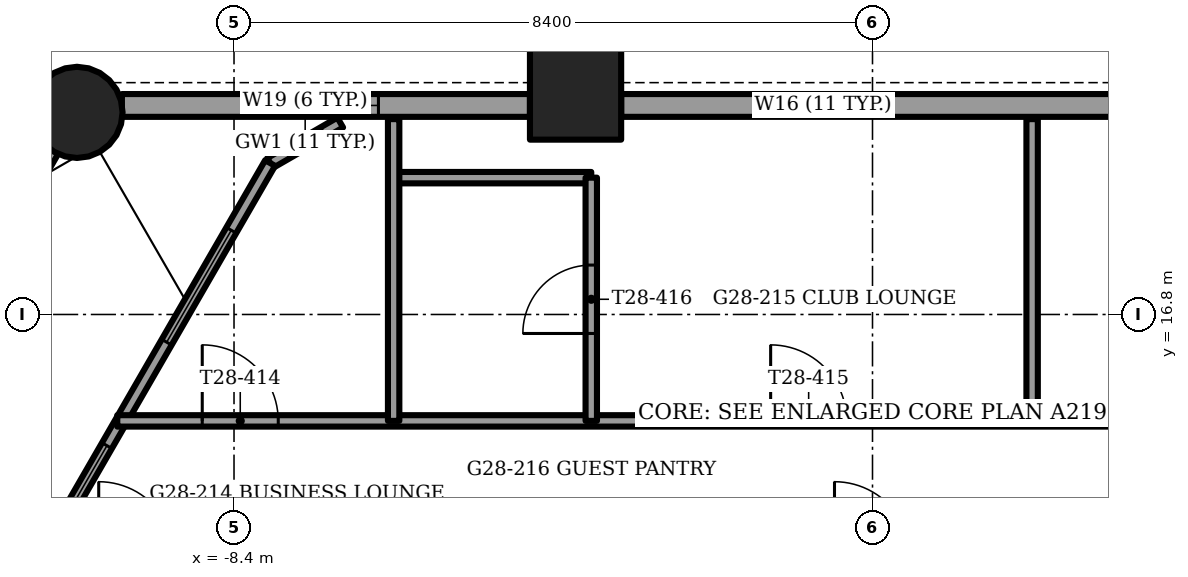
"""IFC4 building model, lengths in metres.
Left out: names, types, materials, properties, quantities, classifications, styles, units other than length and angle.
Written with IfcOpenShell. Run it as: python <this file> out.ifc"""

import sys

from ifc_helpers import new_model, si_unit, direction, frame, frame_2d, origin, origin_2d, place, context, subcontext, project, spatial, rectangle, circle, extrude, element, fill, save


model = new_model("IFC4")
c1 = context("Model", 3, precision=1e-05, world=origin(), true_north=direction((0.0, 1.0)))
c2 = subcontext(c1, "Body", "Model", "MODEL_VIEW")
j1 = project(units=[si_unit("LENGTHUNIT", "METRE"), si_unit("PLANEANGLEUNIT", "RADIAN")], contexts=[c1])
p1 = place(None, origin())
s1 = spatial("IfcSite", under=j1, at=p1, CompositionType="ELEMENT")
p2 = place(p1, origin())
s2 = spatial("IfcBuilding", under=s1, at=p2, CompositionType="ELEMENT")
p3 = place(p2, frame((0.0, 0.0, 116.0)))
s3 = spatial("IfcBuildingStorey", under=s2, at=p3, CompositionType="ELEMENT", Elevation=116.0)
p4 = place(p3, frame((-10.466, 19.459, -1.2), z_axis=(0.0, 0.0, 1.0), x_axis=(1.0, 0.0, 0.0)))
e1 = element("IfcColumn", 1, at=p4, inside=s3, PredefinedType="COLUMN", context=c2, shape_type="SweptSolid", body=[
    extrude(circle(Radius=0.6, at=origin_2d()), origin(), (0.0, 0.0, 1.0), 3.75),
])
p5 = place(p3, frame((-3.907, 19.7, -1.2), z_axis=(0.0, 0.0, 1.0), x_axis=(1.0, 0.0, 0.0)))
e2 = element("IfcColumn", 2, at=p5, inside=s3, PredefinedType="COLUMN", context=c2, shape_type="SweptSolid", body=[
    extrude(rectangle(XDim=1.2, YDim=1.2, at=origin_2d()), origin(), (0.0, 0.0, 1.0), 3.75),
])
p6 = place(p3, frame((-11.017, 19.286, 0.0), z_axis=(0.0, 0.0, 1.0), x_axis=(-0.500012951941, -0.866017925849, 0.0)))
e3 = element("IfcWall", 3, at=p6, inside=s3, PredefinedType="PARAPET", context=c2, shape_type="SweptSolid", body=[
    extrude(rectangle(XDim=6.717, YDim=0.9, at=frame_2d((3.358, 0.0))), origin(), (0.0, 0.0, 1.0), 1.1),
])
p7 = place(p3, frame((3.307, 19.55, 0.0), z_axis=(0.0, 0.0, 1.0), x_axis=(-1.0, 0.0, 0.0)))
e4 = element("IfcWall", 4, at=p7, inside=s3, PredefinedType="SOLIDWALL", context=c2, shape_type="SweptSolid", body=[
    extrude(rectangle(XDim=6.613, YDim=0.3, at=frame_2d((3.307, 0.0))), origin(), (0.0, 0.0, 1.0), 2.55),
])
p8 = place(p7, frame((3.507, 0.0, 0.15)))
e5 = element("IfcOpeningElement", 5, at=p8, cuts=e4, PredefinedType="OPENING", context=c2, shape_type="SweptSolid", body=[
    extrude(rectangle(XDim=0.9, YDim=2.15, at=frame_2d((0.45, 1.075))), frame((0.0, 0.15, 0.0), z_axis=(0.0, -1.0, 0.0), x_axis=(1.0, 0.0, 0.0)), (0.0, 0.0, 1.0), 0.3),
])
p9 = place(p3, frame((-4.507, 19.55, 0.0), z_axis=(0.0, 0.0, 1.0), x_axis=(-1.0, 0.0, 0.0)))
e6 = element("IfcWall", 6, at=p9, inside=s3, PredefinedType="SOLIDWALL", context=c2, shape_type="SweptSolid", body=[
    extrude(rectangle(XDim=5.368, YDim=0.3, at=frame_2d((2.684, 0.0))), origin(), (0.0, 0.0, 1.0), 2.55),
])
p10 = place(p9, frame((1.993, 0.0, 0.15)))
e7 = element("IfcOpeningElement", 7, at=p10, cuts=e6, PredefinedType="OPENING", context=c2, shape_type="SweptSolid", body=[
    extrude(rectangle(XDim=0.9, YDim=2.15, at=frame_2d((0.45, 1.075))), frame((0.0, 0.15, 0.0), z_axis=(0.0, -1.0, 0.0), x_axis=(1.0, 0.0, 0.0)), (0.0, 0.0, 1.0), 0.3),
])
p11 = place(p3, frame((-7.925, 18.792, 0.0), z_axis=(0.0, 0.0, 1.0), x_axis=(-0.499994842654, -0.866028381359, 0.0)))
e8 = element("IfcWall", 8, at=p11, inside=s3, PredefinedType="SOLIDWALL", context=c2, shape_type="SweptSolid", body=[
    extrude(rectangle(XDim=21.853, YDim=0.15, at=frame_2d((10.927, 0.0))), origin(), (0.0, 0.0, 1.0), 3.45),
])
p12 = place(p11, frame((4.293, 0.0, 0.15)))
e9 = element("IfcOpeningElement", 9, at=p12, cuts=e8, PredefinedType="OPENING", context=c2, shape_type="SweptSolid", body=[
    extrude(rectangle(XDim=0.9, YDim=2.85, at=frame_2d((0.45, 1.425))), frame((0.0, 0.075, 0.0), z_axis=(0.0, -1.0, 0.0), x_axis=(1.0, 0.0, 0.0)), (0.0, 0.0, 1.0), 0.15),
])
p13 = place(p11, frame((8.412, 0.0, 0.15)))
e10 = element("IfcOpeningElement", 10, at=p13, cuts=e8, PredefinedType="OPENING", context=c2, shape_type="SweptSolid", body=[
    extrude(rectangle(XDim=0.9, YDim=2.85, at=frame_2d((0.45, 1.425))), frame((0.0, 0.075, 0.0), z_axis=(0.0, -1.0, 0.0), x_axis=(1.0, 0.0, 0.0)), (0.0, 0.0, 1.0), 0.15),
])
p14 = place(p11, frame((12.612, 0.0, 0.15)))
e11 = element("IfcOpeningElement", 11, at=p14, cuts=e8, PredefinedType="OPENING", context=c2, shape_type="SweptSolid", body=[
    extrude(rectangle(XDim=1.7, YDim=2.85, at=frame_2d((0.85, 1.425))), frame((0.0, 0.075, 0.0), z_axis=(0.0, -1.0, 0.0), x_axis=(1.0, 0.0, 0.0)), (0.0, 0.0, 1.0), 0.15),
])
p15 = place(p11, frame((14.712, 0.0, 0.15)))
e12 = element("IfcOpeningElement", 12, at=p15, cuts=e8, PredefinedType="OPENING", context=c2, shape_type="SweptSolid", body=[
    extrude(rectangle(XDim=1.5, YDim=2.85, at=frame_2d((0.75, 1.425))), frame((0.0, 0.075, 0.0), z_axis=(0.0, -1.0, 0.0), x_axis=(1.0, 0.0, 0.0)), (0.0, 0.0, 1.0), 0.15),
])
p16 = place(p11, frame((16.812, 0.0, 0.15)))
e13 = element("IfcOpeningElement", 13, at=p16, cuts=e8, PredefinedType="OPENING", context=c2, shape_type="SweptSolid", body=[
    extrude(rectangle(XDim=1.7, YDim=2.85, at=frame_2d((0.85, 1.425))), frame((0.0, 0.075, 0.0), z_axis=(0.0, -1.0, 0.0), x_axis=(1.0, 0.0, 0.0)), (0.0, 0.0, 1.0), 0.15),
])
p17 = place(p11, frame((18.912, 0.0, 0.15)))
e14 = element("IfcOpeningElement", 14, at=p17, cuts=e8, PredefinedType="OPENING", context=c2, shape_type="SweptSolid", body=[
    extrude(rectangle(XDim=1.5, YDim=2.85, at=frame_2d((0.75, 1.425))), frame((0.0, 0.075, 0.0), z_axis=(0.0, -1.0, 0.0), x_axis=(1.0, 0.0, 0.0)), (0.0, 0.0, 1.0), 0.15),
])
p18 = place(p11, frame((1.022, 0.0, 0.15)))
e15 = element("IfcOpeningElement", 15, at=p18, cuts=e8, PredefinedType="OPENING", context=c2, shape_type="SweptSolid", body=[
    extrude(rectangle(XDim=1.7, YDim=2.73, at=frame_2d((0.85, 1.365))), frame((0.0, 0.075, 0.0), z_axis=(0.0, -1.0, 0.0), x_axis=(1.0, 0.0, 0.0)), (0.0, 0.0, 1.0), 0.15),
])
p19 = place(p3, frame((-7.003, 19.325, 0.0), z_axis=(0.0, 0.0, 1.0), x_axis=(-0.866048165231, -0.499960573946, 0.0)))
e16 = element("IfcWall", 16, at=p19, inside=s3, PredefinedType="SOLIDWALL", context=c2, shape_type="SweptSolid", body=[
    extrude(rectangle(XDim=1.065, YDim=0.15, at=frame_2d((0.532, 0.0))), origin(), (0.0, 0.0, 1.0), 3.45),
])
p20 = place(p19, frame((0.258, 0.0, 0.15)))
e17 = element("IfcOpeningElement", 17, at=p20, cuts=e16, PredefinedType="OPENING", context=c2, shape_type="SweptSolid", body=[
    extrude(rectangle(XDim=0.55, YDim=2.85, at=frame_2d((0.275, 1.425))), frame((0.0, 0.075, 0.0), z_axis=(0.0, -1.0, 0.0), x_axis=(1.0, 0.0, 0.0)), (0.0, 0.0, 1.0), 0.15),
])
p21 = place(p3, frame((-9.936, 15.4, 0.0), z_axis=(0.0, 0.0, 1.0), x_axis=(1.0, 0.0, 0.0)))
e18 = element("IfcWall", 18, at=p21, inside=s3, PredefinedType="PARTITIONING", context=c2, shape_type="SweptSolid", body=[
    extrude(rectangle(XDim=19.872, YDim=0.15, at=frame_2d((9.936, 0.0))), origin(), (0.0, 0.0, 1.0), 3.45),
])
p22 = place(p21, frame((1.118, 0.0, 0.0)))
e19 = element("IfcOpeningElement", 19, at=p22, cuts=e18, PredefinedType="OPENING", context=c2, shape_type="SweptSolid", body=[
    extrude(rectangle(XDim=1.0, YDim=2.1, at=frame_2d((0.5, 1.05))), frame((0.0, 0.075, 0.0), z_axis=(0.0, -1.0, 0.0), x_axis=(1.0, 0.0, 0.0)), (0.0, 0.0, 1.0), 0.15),
])
p23 = place(p21, frame((8.596, 0.0, 0.0)))
e20 = element("IfcOpeningElement", 20, at=p23, cuts=e18, PredefinedType="OPENING", context=c2, shape_type="SweptSolid", body=[
    extrude(rectangle(XDim=1.0, YDim=2.1, at=frame_2d((0.5, 1.05))), frame((0.0, 0.075, 0.0), z_axis=(0.0, -1.0, 0.0), x_axis=(1.0, 0.0, 0.0)), (0.0, 0.0, 1.0), 0.15),
])
p24 = place(p21, frame((15.383, 0.0, 0.0)))
e21 = element("IfcOpeningElement", 21, at=p24, cuts=e18, PredefinedType="OPENING", context=c2, shape_type="SweptSolid", body=[
    extrude(rectangle(XDim=1.0, YDim=2.1, at=frame_2d((0.5, 1.05))), frame((0.0, 0.075, 0.0), z_axis=(0.0, -1.0, 0.0), x_axis=(1.0, 0.0, 0.0)), (0.0, 0.0, 1.0), 0.15),
])
p25 = place(p3, frame((-6.3, 18.6, 0.0), z_axis=(0.0, 0.0, 1.0), x_axis=(1.0, 0.0, 0.0)))
e22 = element("IfcWall", 22, at=p25, inside=s3, PredefinedType="PARTITIONING", context=c2, shape_type="SweptSolid", body=[
    extrude(rectangle(XDim=2.6, YDim=0.15, at=frame_2d((1.3, 0.0))), origin(), (0.0, 0.0, 1.0), 3.45),
])
p26 = place(p3, frame((2.1, 15.4, 0.0), z_axis=(0.0, 0.0, 1.0), x_axis=(0.0, 1.0, 0.0)))
e23 = element("IfcWall", 23, at=p26, inside=s3, PredefinedType="PARTITIONING", context=c2, shape_type="SweptSolid", body=[
    extrude(rectangle(XDim=3.97, YDim=0.15, at=frame_2d((1.985, 0.0))), origin(), (0.0, 0.0, 1.0), 3.45),
])
p27 = place(p3, frame((-3.7, 15.4, 0.0), z_axis=(0.0, 0.0, 1.0), x_axis=(0.0, 1.0, 0.0)))
e24 = element("IfcWall", 24, at=p27, inside=s3, PredefinedType="PARTITIONING", context=c2, shape_type="SweptSolid", body=[
    extrude(rectangle(XDim=3.2, YDim=0.15, at=frame_2d((1.6, 0.0))), origin(), (0.0, 0.0, 1.0), 3.45),
])
p28 = place(p27, frame((1.15, 0.0, 0.0)))
e25 = element("IfcOpeningElement", 25, at=p28, cuts=e24, PredefinedType="OPENING", context=c2, shape_type="SweptSolid", body=[
    extrude(rectangle(XDim=0.9, YDim=2.1, at=frame_2d((0.45, 1.05))), frame((0.0, 0.075, 0.0), z_axis=(0.0, -1.0, 0.0), x_axis=(1.0, 0.0, 0.0)), (0.0, 0.0, 1.0), 0.15),
])
p29 = place(p3, frame((-6.3, 15.4, 0.0), z_axis=(0.0, 0.0, 1.0), x_axis=(0.0, 1.0, 0.0)))
e26 = element("IfcWall", 26, at=p29, inside=s3, PredefinedType="PARTITIONING", context=c2, shape_type="SweptSolid", body=[
    extrude(rectangle(XDim=3.97, YDim=0.15, at=frame_2d((1.985, 0.0))), origin(), (0.0, 0.0, 1.0), 3.45),
])
p30 = place(p8, origin())
e27 = element("IfcWindow", 27, at=p30, inside=s3, PartitioningType="SINGLE_PANEL", PredefinedType="WINDOW", context=c2, shape_type="SweptSolid", body=[
    extrude(rectangle(XDim=0.9, YDim=2.15, at=frame_2d((0.45, 1.075))), frame((0.0, 0.03, 0.0), z_axis=(0.0, -1.0, 0.0), x_axis=(1.0, 0.0, 0.0)), (0.0, 0.0, 1.0), 0.06),
])
fill(e5, e27)
p31 = place(p10, origin())
e28 = element("IfcWindow", 28, at=p31, inside=s3, PartitioningType="SINGLE_PANEL", PredefinedType="WINDOW", context=c2, shape_type="SweptSolid", body=[
    extrude(rectangle(XDim=0.9, YDim=2.15, at=frame_2d((0.45, 1.075))), frame((0.0, 0.03, 0.0), z_axis=(0.0, -1.0, 0.0), x_axis=(1.0, 0.0, 0.0)), (0.0, 0.0, 1.0), 0.06),
])
fill(e7, e28)
p32 = place(p12, origin())
e29 = element("IfcWindow", 29, at=p32, inside=s3, PartitioningType="SINGLE_PANEL", PredefinedType="WINDOW", context=c2, shape_type="SweptSolid", body=[
    extrude(rectangle(XDim=0.9, YDim=2.85, at=frame_2d((0.45, 1.425))), frame((0.0, 0.03, 0.0), z_axis=(0.0, -1.0, 0.0), x_axis=(1.0, 0.0, 0.0)), (0.0, 0.0, 1.0), 0.06),
])
fill(e9, e29)
p33 = place(p18, origin())
e30 = element("IfcWindow", 30, at=p33, inside=s3, PartitioningType="SINGLE_PANEL", PredefinedType="WINDOW", context=c2, shape_type="SweptSolid", body=[
    extrude(rectangle(XDim=1.7, YDim=2.73, at=frame_2d((0.85, 1.365))), frame((0.0, 0.03, 0.0), z_axis=(0.0, -1.0, 0.0), x_axis=(1.0, 0.0, 0.0)), (0.0, 0.0, 1.0), 0.06),
])
fill(e15, e30)
p34 = place(p20, origin())
e31 = element("IfcWindow", 31, at=p34, inside=s3, PartitioningType="SINGLE_PANEL", PredefinedType="WINDOW", context=c2, shape_type="SweptSolid", body=[
    extrude(rectangle(XDim=0.55, YDim=2.85, at=frame_2d((0.275, 1.425))), frame((0.0, 0.03, 0.0), z_axis=(0.0, -1.0, 0.0), x_axis=(1.0, 0.0, 0.0)), (0.0, 0.0, 1.0), 0.06),
])
fill(e17, e31)
p35 = place(p22, origin())
e32 = element("IfcDoor", 32, at=p35, inside=s3, OperationType="SINGLE_SWING_LEFT", PredefinedType="DOOR", context=c2, shape_type="SweptSolid", body=[
    extrude(rectangle(XDim=1.0, YDim=2.1, at=frame_2d((0.5, 1.05))), frame((0.0, 0.025, 0.0), z_axis=(0.0, -1.0, 0.0), x_axis=(1.0, 0.0, 0.0)), (0.0, 0.0, 1.0), 0.05),
])
fill(e19, e32)
p36 = place(p23, origin())
e33 = element("IfcDoor", 33, at=p36, inside=s3, OperationType="SINGLE_SWING_RIGHT", PredefinedType="DOOR", context=c2, shape_type="SweptSolid", body=[
    extrude(rectangle(XDim=1.0, YDim=2.1, at=frame_2d((0.5, 1.05))), frame((0.0, 0.025, 0.0), z_axis=(0.0, -1.0, 0.0), x_axis=(1.0, 0.0, 0.0)), (0.0, 0.0, 1.0), 0.05),
])
fill(e20, e33)
p37 = place(p28, origin())
e34 = element("IfcDoor", 34, at=p37, inside=s3, OperationType="SINGLE_SWING_LEFT", PredefinedType="DOOR", context=c2, shape_type="SweptSolid", body=[
    extrude(rectangle(XDim=0.9, YDim=2.1, at=frame_2d((0.45, 1.05))), frame((0.0, 0.025, 0.0), z_axis=(0.0, -1.0, 0.0), x_axis=(1.0, 0.0, 0.0)), (0.0, 0.0, 1.0), 0.05),
])
fill(e25, e34)
save(model, sys.argv[1])
